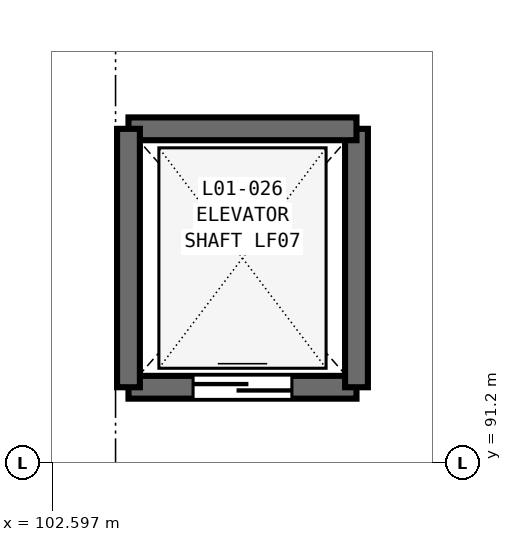
"""IFC4 building model, lengths in metres.
Left out: names, types, materials, properties, quantities, classifications, styles, units other than length and angle.
Written with IfcOpenShell. Run it as: python <this file> out.ifc"""

import sys

from ifc_helpers import new_model, si_unit, direction, frame, frame_2d, origin, place, context, subcontext, project, spatial, rectangle, extrude, element, fill, save


model = new_model("IFC4")
c1 = context("Model", 3, precision=1e-05, world=origin(), true_north=direction((0.0, 1.0)))
c2 = subcontext(c1, "Body", "Model", "MODEL_VIEW")
j1 = project(units=[si_unit("LENGTHUNIT", "METRE"), si_unit("PLANEANGLEUNIT", "RADIAN")], contexts=[c1])
p1 = place(None, origin())
s1 = spatial("IfcSite", under=j1, at=p1, CompositionType="ELEMENT")
p2 = place(p1, origin())
s2 = spatial("IfcBuilding", under=s1, at=p2, CompositionType="ELEMENT")
p3 = place(p2, frame((0.0, 0.0, 5.4)))
s3 = spatial("IfcBuildingStorey", under=s2, at=p3, CompositionType="ELEMENT", Elevation=5.4)
p4 = place(p3, frame((103.6, 92.2, 0.0), z_axis=(0.0, 0.0, 1.0), x_axis=(1.0, 0.0, 0.0)))
e1 = element("IfcWall", 1, at=p4, inside=s3, PredefinedType="SHEAR", context=c2, shape_type="SweptSolid", body=[
    extrude(rectangle(XDim=3.0, YDim=0.3, at=frame_2d((1.5, 0.0))), origin(), (0.0, 0.0, 1.0), 5.4),
])
p5 = place(p4, frame((0.85, 0.0, 0.0)))
e2 = element("IfcOpeningElement", 2, at=p5, cuts=e1, PredefinedType="OPENING", context=c2, shape_type="SweptSolid", body=[
    extrude(rectangle(XDim=1.3, YDim=2.2, at=frame_2d((0.65, 1.1))), frame((0.0, 0.16, 0.0), z_axis=(0.0, -1.0, 0.0), x_axis=(1.0, 0.0, 0.0)), (0.0, 0.0, 1.0), 0.32),
])
p6 = place(p3, frame((106.6, 92.2, 0.0), z_axis=(0.0, 0.0, 1.0), x_axis=(0.0, 1.0, 0.0)))
e3 = element("IfcWall", 3, at=p6, inside=s3, PredefinedType="SHEAR", context=c2, shape_type="SweptSolid", body=[
    extrude(rectangle(XDim=3.4, YDim=0.3, at=frame_2d((1.7, 0.0))), origin(), (0.0, 0.0, 1.0), 5.4),
])
p7 = place(p3, frame((106.6, 95.6, 0.0), z_axis=(0.0, 0.0, 1.0), x_axis=(-1.0, 0.0, 0.0)))
e4 = element("IfcWall", 4, at=p7, inside=s3, PredefinedType="SHEAR", context=c2, shape_type="SweptSolid", body=[
    extrude(rectangle(XDim=3.0, YDim=0.3, at=frame_2d((1.5, 0.0))), origin(), (0.0, 0.0, 1.0), 5.4),
])
p8 = place(p3, frame((103.6, 95.6, 0.0), z_axis=(0.0, 0.0, 1.0), x_axis=(0.0, -1.0, 0.0)))
e5 = element("IfcWall", 5, at=p8, inside=s3, PredefinedType="SHEAR", context=c2, shape_type="SweptSolid", body=[
    extrude(rectangle(XDim=3.4, YDim=0.3, at=frame_2d((1.7, 0.0))), origin(), (0.0, 0.0, 1.0), 5.4),
])
p9 = place(p5, origin())
e6 = element("IfcDoor", 6, at=p9, inside=s3, OperationType="DOUBLE_DOOR_SLIDING", PredefinedType="DOOR", context=c2, shape_type="SweptSolid", body=[
    extrude(rectangle(XDim=1.3, YDim=2.2, at=frame_2d((0.65, 1.1))), frame((0.0, 0.025, 0.0), z_axis=(0.0, -1.0, 0.0), x_axis=(1.0, 0.0, 0.0)), (0.0, 0.0, 1.0), 0.05),
])
fill(e2, e6)
save(model, sys.argv[1])
